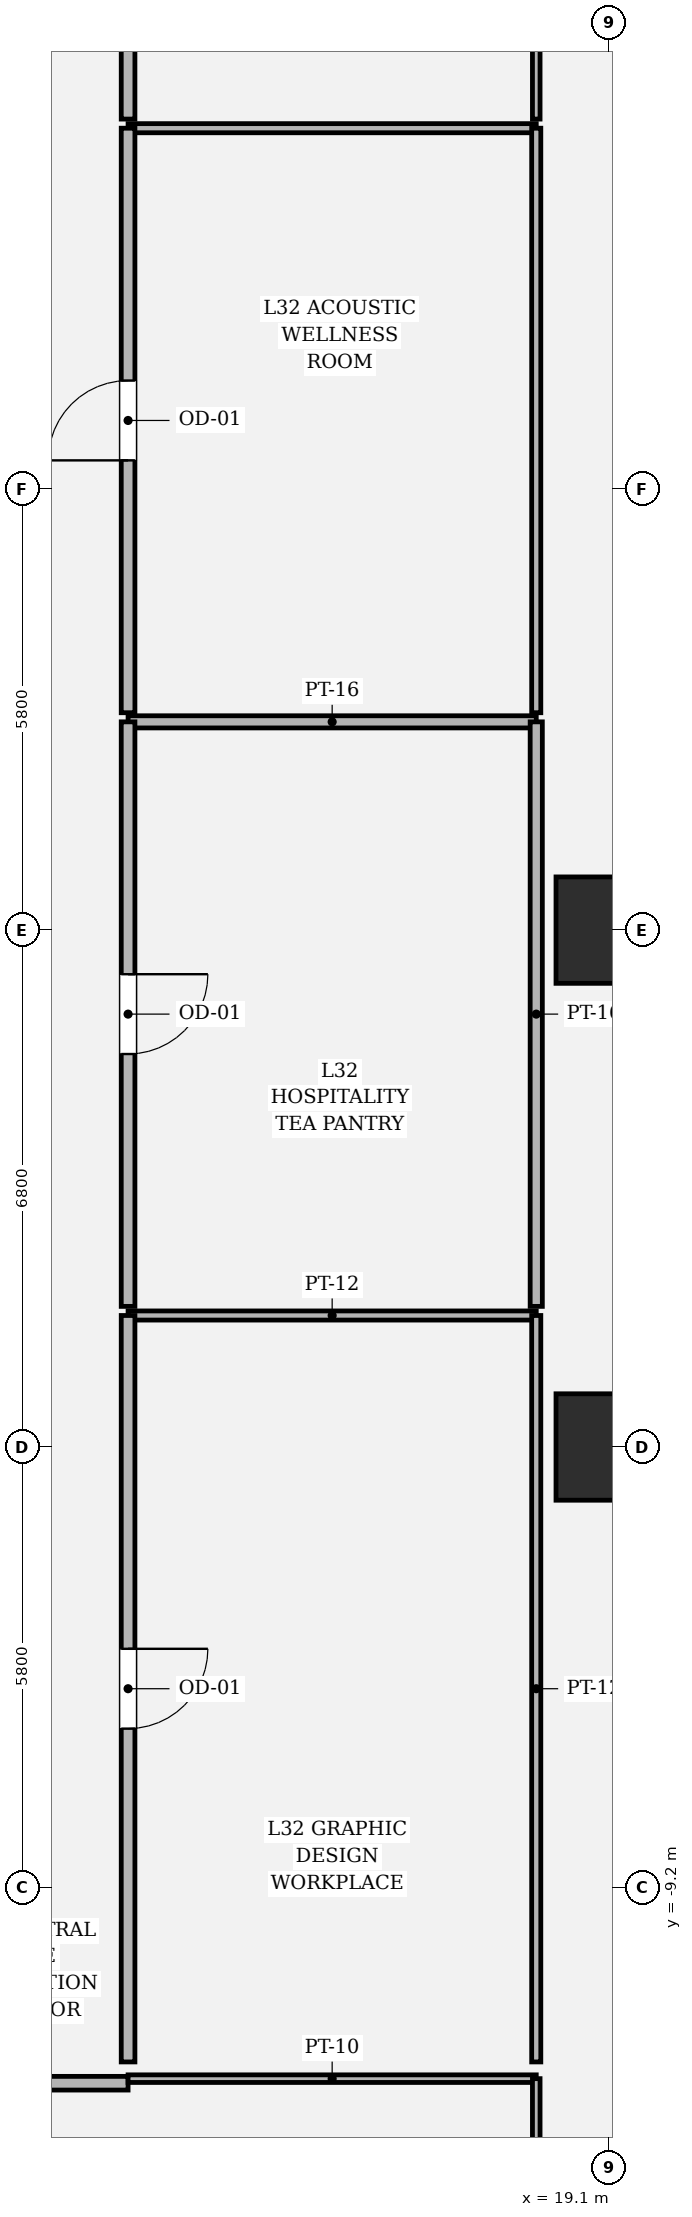
"""IFC4 building model, lengths in metres.
Left out: names, types, materials, properties, quantities, classifications, styles, units other than length and angle.
Written with IfcOpenShell. Run it as: python <this file> out.ifc"""

import sys

from ifc_helpers import new_model, si_unit, direction, frame, frame_2d, origin, origin_2d, place, context, subcontext, project, spatial, rectangle, hollow_rectangle, extrude, element, fill, save


model = new_model("IFC4")
c1 = context("Model", 3, precision=1e-05, world=origin(), true_north=direction((0.0, 1.0)))
c2 = subcontext(c1, "Body", "Model", "MODEL_VIEW")
j1 = project(units=[si_unit("LENGTHUNIT", "METRE"), si_unit("PLANEANGLEUNIT", "RADIAN")], contexts=[c1])
p1 = place(None, origin())
s1 = spatial("IfcSite", under=j1, at=p1, CompositionType="ELEMENT")
p2 = place(p1, origin())
s2 = spatial("IfcBuilding", under=s1, at=p2, CompositionType="ELEMENT")
p3 = place(p2, frame((0.0, 0.0, 139.8)))
s3 = spatial("IfcBuildingStorey", under=s2, at=p3, CompositionType="ELEMENT", Elevation=139.8)
for number, where, z_axis, x_axis in (
    (1, (19.1, -3.4, 0.0), (0.0, 0.0, 1.0), (1.0, 0.0, 0.0)),
    (2, (19.1, 3.4, 0.0), (0.0, 0.0, 1.0), (1.0, 0.0, 0.0)),
):
    element("IfcColumn", number, at=place(p3, frame(where, z_axis=z_axis, x_axis=x_axis)), inside=s3, PredefinedType="COLUMN", context=c2, shape_type="SweptSolid", body=[
        extrude(hollow_rectangle(XDim=1.4, YDim=1.4, WallThickness=0.042, at=origin_2d()), origin(), (0.0, 0.0, 1.0), 4.05),
    ])
p4 = place(p3, frame((0.438, -11.77, 0.0), z_axis=(0.0, 0.0, 1.0), x_axis=(1.0, 0.0, 0.0)))
e3 = element("IfcWall", 3, at=p4, inside=s3, PredefinedType="PARTITIONING", context=c2, shape_type="SweptSolid", body=[
    extrude(rectangle(XDim=12.332, YDim=0.18, at=frame_2d((6.166, 0.0))), origin(), (0.0, 0.0, 1.0), 3.174),
])
p5 = place(p4, frame((5.466, 0.0, 0.0)))
e4 = element("IfcOpeningElement", 4, at=p5, cuts=e3, PredefinedType="OPENING", context=c2, shape_type="SweptSolid", body=[
    extrude(rectangle(XDim=1.4, YDim=2.25, at=frame_2d((0.7, 1.125))), frame((0.0, 0.1, 0.0), z_axis=(0.0, -1.0, 0.0), x_axis=(1.0, 0.0, 0.0)), (0.0, 0.0, 1.0), 0.2),
])
p6 = place(p3, frame((12.77, -11.71, 0.0), z_axis=(0.0, 0.0, 1.0), x_axis=(1.0, 0.0, 0.0)))
e5 = element("IfcWall", 5, at=p6, inside=s3, PredefinedType="PARTITIONING", context=c2, shape_type="SweptSolid", body=[
    extrude(rectangle(XDim=5.37, YDim=0.1, at=frame_2d((2.685, 0.0))), origin(), (0.0, 0.0, 1.0), 3.424),
])
p7 = place(p3, frame((18.14, -11.71, 0.0), z_axis=(0.0, 0.0, 1.0), x_axis=(0.0, -1.0, 0.0)))
e6 = element("IfcWall", 6, at=p7, inside=s3, PredefinedType="PARTITIONING", context=c2, shape_type="SweptSolid", body=[
    extrude(rectangle(XDim=4.83, YDim=0.1, at=frame_2d((2.415, 0.0))), origin(), (0.0, 0.0, 1.0), 3.424),
])
p8 = place(p3, frame((12.77, -1.67, 0.0), z_axis=(0.0, 0.0, 1.0), x_axis=(1.0, 0.0, 0.0)))
e7 = element("IfcWall", 7, at=p8, inside=s3, PredefinedType="PARTITIONING", context=c2, shape_type="SweptSolid", body=[
    extrude(rectangle(XDim=5.37, YDim=0.12, at=frame_2d((2.685, 0.0))), origin(), (0.0, 0.0, 1.0), 3.83),
])
p9 = place(p3, frame((18.14, -1.67, 0.0), z_axis=(0.0, 0.0, 1.0), x_axis=(0.0, -1.0, 0.0)))
e8 = element("IfcWall", 8, at=p9, inside=s3, PredefinedType="PARTITIONING", context=c2, shape_type="SweptSolid", body=[
    extrude(rectangle(XDim=9.82, YDim=0.12, at=frame_2d((4.91, 0.0))), origin(), (0.0, 0.0, 1.0), 3.174),
])
p10 = place(p3, frame((12.77, -11.49, 0.0), z_axis=(0.0, 0.0, 1.0), x_axis=(0.0, 1.0, 0.0)))
e9 = element("IfcWall", 9, at=p10, inside=s3, PredefinedType="PARTITIONING", context=c2, shape_type="SweptSolid", body=[
    extrude(rectangle(XDim=9.82, YDim=0.18, at=frame_2d((4.91, 0.0))), origin(), (0.0, 0.0, 1.0), 3.174),
])
p11 = place(p10, frame((4.385, 0.0, 0.0)))
e10 = element("IfcOpeningElement", 10, at=p11, cuts=e9, PredefinedType="OPENING", context=c2, shape_type="SweptSolid", body=[
    extrude(rectangle(XDim=1.05, YDim=2.2, at=frame_2d((0.525, 1.1))), frame((0.0, 0.1, 0.0), z_axis=(0.0, -1.0, 0.0), x_axis=(1.0, 0.0, 0.0)), (0.0, 0.0, 1.0), 0.2),
])
p12 = place(p3, frame((12.77, 6.14, 0.0), z_axis=(0.0, 0.0, 1.0), x_axis=(1.0, 0.0, 0.0)))
e11 = element("IfcWall", 11, at=p12, inside=s3, PredefinedType="PARTITIONING", context=c2, shape_type="SweptSolid", body=[
    extrude(rectangle(XDim=5.37, YDim=0.16, at=frame_2d((2.685, 0.0))), origin(), (0.0, 0.0, 1.0), 3.83),
])
p13 = place(p3, frame((18.14, 6.14, 0.0), z_axis=(0.0, 0.0, 1.0), x_axis=(0.0, -1.0, 0.0)))
e12 = element("IfcWall", 12, at=p13, inside=s3, PredefinedType="PARTITIONING", context=c2, shape_type="SweptSolid", body=[
    extrude(rectangle(XDim=7.69, YDim=0.16, at=frame_2d((3.845, 0.0))), origin(), (0.0, 0.0, 1.0), 3.174),
])
p14 = place(p3, frame((12.77, -1.55, 0.0), z_axis=(0.0, 0.0, 1.0), x_axis=(0.0, 1.0, 0.0)))
e13 = element("IfcWall", 13, at=p14, inside=s3, PredefinedType="PARTITIONING", context=c2, shape_type="SweptSolid", body=[
    extrude(rectangle(XDim=7.69, YDim=0.18, at=frame_2d((3.845, 0.0))), origin(), (0.0, 0.0, 1.0), 3.174),
])
p15 = place(p14, frame((3.32, 0.0, 0.0)))
e14 = element("IfcOpeningElement", 14, at=p15, cuts=e13, PredefinedType="OPENING", context=c2, shape_type="SweptSolid", body=[
    extrude(rectangle(XDim=1.05, YDim=2.2, at=frame_2d((0.525, 1.1))), frame((0.0, 0.1, 0.0), z_axis=(0.0, -1.0, 0.0), x_axis=(1.0, 0.0, 0.0)), (0.0, 0.0, 1.0), 0.2),
])
p16 = place(p3, frame((12.77, 13.95, 0.0), z_axis=(0.0, 0.0, 1.0), x_axis=(1.0, 0.0, 0.0)))
e15 = element("IfcWall", 15, at=p16, inside=s3, PredefinedType="PARTITIONING", context=c2, shape_type="SweptSolid", body=[
    extrude(rectangle(XDim=5.37, YDim=0.12, at=frame_2d((2.685, 0.0))), origin(), (0.0, 0.0, 1.0), 3.424),
])
p17 = place(p3, frame((18.14, 13.95, 0.0), z_axis=(0.0, 0.0, 1.0), x_axis=(0.0, -1.0, 0.0)))
e16 = element("IfcWall", 16, at=p17, inside=s3, PredefinedType="PARTITIONING", context=c2, shape_type="SweptSolid", body=[
    extrude(rectangle(XDim=7.69, YDim=0.12, at=frame_2d((3.845, 0.0))), origin(), (0.0, 0.0, 1.0), 3.174),
])
p18 = place(p3, frame((12.77, 6.26, 0.0), z_axis=(0.0, 0.0, 1.0), x_axis=(0.0, 1.0, 0.0)))
e17 = element("IfcWall", 17, at=p18, inside=s3, PredefinedType="PARTITIONING", context=c2, shape_type="SweptSolid", body=[
    extrude(rectangle(XDim=7.69, YDim=0.18, at=frame_2d((3.845, 0.0))), origin(), (0.0, 0.0, 1.0), 3.174),
])
p19 = place(p18, frame((3.32, 0.0, 0.0)))
e18 = element("IfcOpeningElement", 18, at=p19, cuts=e17, PredefinedType="OPENING", context=c2, shape_type="SweptSolid", body=[
    extrude(rectangle(XDim=1.05, YDim=2.2, at=frame_2d((0.525, 1.1))), frame((0.0, 0.1, 0.0), z_axis=(0.0, -1.0, 0.0), x_axis=(1.0, 0.0, 0.0)), (0.0, 0.0, 1.0), 0.2),
])
p20 = place(p3, frame((18.14, 22.44, 0.0), z_axis=(0.0, 0.0, 1.0), x_axis=(0.0, -1.0, 0.0)))
e19 = element("IfcWall", 19, at=p20, inside=s3, PredefinedType="PARTITIONING", context=c2, shape_type="SweptSolid", body=[
    extrude(rectangle(XDim=8.37, YDim=0.1, at=frame_2d((4.185, 0.0))), origin(), (0.0, 0.0, 1.0), 3.174),
])
p21 = place(p3, frame((12.77, 14.07, 0.0), z_axis=(0.0, 0.0, 1.0), x_axis=(0.0, 1.0, 0.0)))
e20 = element("IfcWall", 20, at=p21, inside=s3, PredefinedType="PARTITIONING", context=c2, shape_type="SweptSolid", body=[
    extrude(rectangle(XDim=8.37, YDim=0.18, at=frame_2d((4.185, 0.0))), origin(), (0.0, 0.0, 1.0), 3.174),
])
p22 = place(p21, frame((3.675, 0.0, 0.0)))
e21 = element("IfcOpeningElement", 21, at=p22, cuts=e20, PredefinedType="OPENING", context=c2, shape_type="SweptSolid", body=[
    extrude(rectangle(XDim=1.02, YDim=2.2, at=frame_2d((0.51, 1.1))), frame((0.0, 0.1, 0.0), z_axis=(0.0, -1.0, 0.0), x_axis=(1.0, 0.0, 0.0)), (0.0, 0.0, 1.0), 0.2),
])
p23 = place(p11, origin())
e22 = element("IfcDoor", 22, at=p23, inside=s3, OperationType="SINGLE_SWING_RIGHT", PredefinedType="DOOR", context=c2, shape_type="SweptSolid", body=[
    extrude(rectangle(XDim=1.05, YDim=2.2, at=frame_2d((0.525, 1.1))), frame((0.0, 0.025, 0.0), z_axis=(0.0, -1.0, 0.0), x_axis=(1.0, 0.0, 0.0)), (0.0, 0.0, 1.0), 0.05),
])
fill(e10, e22)
p24 = place(p15, origin())
e23 = element("IfcDoor", 23, at=p24, inside=s3, OperationType="SINGLE_SWING_RIGHT", PredefinedType="DOOR", context=c2, shape_type="SweptSolid", body=[
    extrude(rectangle(XDim=1.05, YDim=2.2, at=frame_2d((0.525, 1.1))), frame((0.0, 0.025, 0.0), z_axis=(0.0, -1.0, 0.0), x_axis=(1.0, 0.0, 0.0)), (0.0, 0.0, 1.0), 0.05),
])
fill(e14, e23)
p25 = place(p19, origin())
e24 = element("IfcDoor", 24, at=p25, inside=s3, OperationType="SINGLE_SWING_LEFT", PredefinedType="DOOR", context=c2, shape_type="SweptSolid", body=[
    extrude(rectangle(XDim=1.05, YDim=2.2, at=frame_2d((0.525, 1.1))), frame((0.0, 0.025, 0.0), z_axis=(0.0, -1.0, 0.0), x_axis=(1.0, 0.0, 0.0)), (0.0, 0.0, 1.0), 0.05),
])
fill(e18, e24)
save(model, sys.argv[1])
